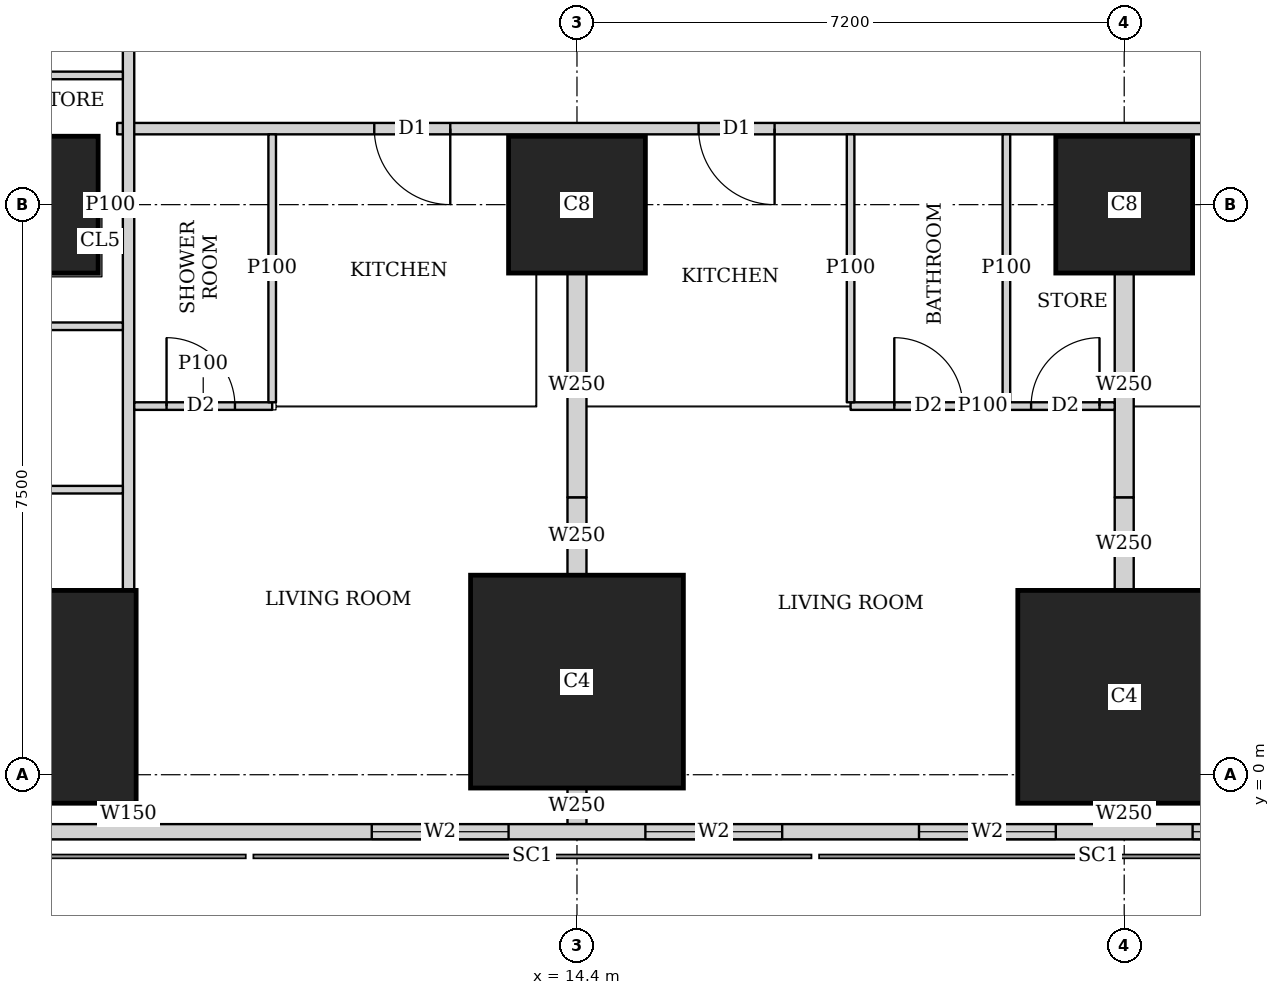
"""IFC4 building model, lengths in metres.
Left out: names, types, materials, properties, quantities, classifications, styles, units other than length and angle.
Written with IfcOpenShell. Run it as: python <this file> out.ifc"""

import sys

from ifc_helpers import new_model, si_unit, direction, frame, frame_2d, origin, origin_2d, place, context, subcontext, project, spatial, rectangle, extrude, element, fill, save


model = new_model("IFC4")
c1 = context("Model", 3, precision=1e-05, world=origin(), true_north=direction((0.0, 1.0)))
c2 = subcontext(c1, "Body", "Model", "MODEL_VIEW")
j1 = project(units=[si_unit("LENGTHUNIT", "METRE"), si_unit("PLANEANGLEUNIT", "RADIAN")], contexts=[c1])
p1 = place(None, origin())
s1 = spatial("IfcSite", under=j1, at=p1, CompositionType="ELEMENT")
p2 = place(p1, origin())
s2 = spatial("IfcBuilding", under=s1, at=p2, CompositionType="ELEMENT")
p3 = place(p2, frame((0.0, 0.0, 42.5)))
s3 = spatial("IfcBuildingStorey", under=s2, at=p3, CompositionType="ELEMENT", Elevation=42.5)
for number, where, z_axis, x_axis in (
    (1, (7.2, 1.025, 0.0), (0.0, 0.0, 1.0), (1.0, 0.0, 0.0)),
    (2, (14.4, 1.225, 0.0), (0.0, 0.0, 1.0), (1.0, 0.0, 0.0)),
    (3, (21.6, 1.025, 0.0), (0.0, 0.0, 1.0), (1.0, 0.0, 0.0)),
):
    element("IfcColumn", number, at=place(p3, frame(where, z_axis=z_axis, x_axis=x_axis)), inside=s3, PredefinedType="COLUMN", context=c2, shape_type="SweptSolid", body=[
        extrude(rectangle(XDim=2.8, YDim=2.8, at=origin_2d()), origin(), (0.0, 0.0, 1.0), 3.75),
    ])
for number, where, z_axis, x_axis in (
    (4, (7.2, 7.5, 0.0), (0.0, 0.0, 1.0), (1.0, 0.0, 0.0)),
    (5, (14.4, 7.5, 0.0), (0.0, 0.0, 1.0), (1.0, 0.0, 0.0)),
    (6, (21.6, 7.5, 0.0), (0.0, 0.0, 1.0), (1.0, 0.0, 0.0)),
):
    element("IfcColumn", number, at=place(p3, frame(where, z_axis=z_axis, x_axis=x_axis)), inside=s3, PredefinedType="COLUMN", context=c2, shape_type="SweptSolid", body=[
        extrude(rectangle(XDim=1.8, YDim=1.8, at=origin_2d()), origin(), (0.0, 0.0, 1.0), 3.75),
    ])
p4 = place(p3, frame((2.163, -0.75, 0.0), z_axis=(0.0, 0.0, 1.0), x_axis=(1.0, 0.0, 0.0)))
e7 = element("IfcWall", 7, at=p4, inside=s3, PredefinedType="SOLIDWALL", context=c2, shape_type="SweptSolid", body=[
    extrude(rectangle(XDim=45.628, YDim=0.2, at=frame_2d((22.814, 0.0))), origin(), (0.0, 0.0, 1.0), 3.5),
])
p5 = place(p4, frame((9.537, 0.0, 0.9)))
e8 = element("IfcOpeningElement", 8, at=p5, cuts=e7, PredefinedType="OPENING", context=c2, shape_type="SweptSolid", body=[
    extrude(rectangle(XDim=1.8, YDim=1.5, at=frame_2d((0.9, 0.75))), frame((0.0, 0.11, 0.0), z_axis=(0.0, -1.0, 0.0), x_axis=(1.0, 0.0, 0.0)), (0.0, 0.0, 1.0), 0.22),
])
p6 = place(p4, frame((13.137, 0.0, 0.9)))
e9 = element("IfcOpeningElement", 9, at=p6, cuts=e7, PredefinedType="OPENING", context=c2, shape_type="SweptSolid", body=[
    extrude(rectangle(XDim=1.8, YDim=1.5, at=frame_2d((0.9, 0.75))), frame((0.0, 0.11, 0.0), z_axis=(0.0, -1.0, 0.0), x_axis=(1.0, 0.0, 0.0)), (0.0, 0.0, 1.0), 0.22),
])
p7 = place(p4, frame((16.737, 0.0, 0.9)))
e10 = element("IfcOpeningElement", 10, at=p7, cuts=e7, PredefinedType="OPENING", context=c2, shape_type="SweptSolid", body=[
    extrude(rectangle(XDim=1.8, YDim=1.5, at=frame_2d((0.9, 0.75))), frame((0.0, 0.11, 0.0), z_axis=(0.0, -1.0, 0.0), x_axis=(1.0, 0.0, 0.0)), (0.0, 0.0, 1.0), 0.22),
])
p8 = place(p4, frame((20.337, 0.0, 0.9)))
e11 = element("IfcOpeningElement", 11, at=p8, cuts=e7, PredefinedType="OPENING", context=c2, shape_type="SweptSolid", body=[
    extrude(rectangle(XDim=1.8, YDim=1.5, at=frame_2d((0.9, 0.75))), frame((0.0, 0.11, 0.0), z_axis=(0.0, -1.0, 0.0), x_axis=(1.0, 0.0, 0.0)), (0.0, 0.0, 1.0), 0.22),
])
p9 = place(p4, frame((23.937, 0.0, 0.9)))
e12 = element("IfcOpeningElement", 12, at=p9, cuts=e7, PredefinedType="OPENING", context=c2, shape_type="SweptSolid", body=[
    extrude(rectangle(XDim=1.8, YDim=1.5, at=frame_2d((0.9, 0.75))), frame((0.0, 0.11, 0.0), z_axis=(0.0, -1.0, 0.0), x_axis=(1.0, 0.0, 0.0)), (0.0, 0.0, 1.0), 0.22),
])
p10 = place(p4, frame((27.537, 0.0, 0.9)))
e13 = element("IfcOpeningElement", 13, at=p10, cuts=e7, PredefinedType="OPENING", context=c2, shape_type="SweptSolid", body=[
    extrude(rectangle(XDim=1.8, YDim=1.5, at=frame_2d((0.9, 0.75))), frame((0.0, 0.11, 0.0), z_axis=(0.0, -1.0, 0.0), x_axis=(1.0, 0.0, 0.0)), (0.0, 0.0, 1.0), 0.22),
])
p11 = place(p4, frame((31.137, 0.0, 0.9)))
e14 = element("IfcOpeningElement", 14, at=p11, cuts=e7, PredefinedType="OPENING", context=c2, shape_type="SweptSolid", body=[
    extrude(rectangle(XDim=1.8, YDim=1.5, at=frame_2d((0.9, 0.75))), frame((0.0, 0.11, 0.0), z_axis=(0.0, -1.0, 0.0), x_axis=(1.0, 0.0, 0.0)), (0.0, 0.0, 1.0), 0.22),
])
p12 = place(p4, frame((34.737, 0.0, 0.9)))
e15 = element("IfcOpeningElement", 15, at=p12, cuts=e7, PredefinedType="OPENING", context=c2, shape_type="SweptSolid", body=[
    extrude(rectangle(XDim=1.8, YDim=1.5, at=frame_2d((0.9, 0.75))), frame((0.0, 0.11, 0.0), z_axis=(0.0, -1.0, 0.0), x_axis=(1.0, 0.0, 0.0)), (0.0, 0.0, 1.0), 0.22),
])
p13 = place(p3, frame((8.5, -0.65, 0.0), z_axis=(0.0, 0.0, 1.0), x_axis=(0.0, 1.0, 0.0)))
e16 = element("IfcWall", 16, at=p13, inside=s3, PredefinedType="SOLIDWALL", context=c2, shape_type="SweptSolid", body=[
    extrude(rectangle(XDim=0.274, YDim=0.15, at=frame_2d((0.137, 0.0))), origin(), (0.0, 0.0, 1.0), 3.5),
])
p14 = place(p3, frame((8.5, 2.426, 0.0), z_axis=(0.0, 0.0, 1.0), x_axis=(0.0, 1.0, 0.0)))
e17 = element("IfcWall", 17, at=p14, inside=s3, PredefinedType="SOLIDWALL", context=c2, shape_type="SweptSolid", body=[
    extrude(rectangle(XDim=40.173, YDim=0.15, at=frame_2d((20.086, 0.0))), origin(), (0.0, 0.0, 1.0), 3.5),
])
p15 = place(p14, frame((9.986, 0.0, 0.0)))
e18 = element("IfcOpeningElement", 18, at=p15, cuts=e17, PredefinedType="OPENING", context=c2, shape_type="SweptSolid", body=[
    extrude(rectangle(XDim=1.0, YDim=2.1, at=frame_2d((0.5, 1.05))), frame((0.0, 0.085, 0.0), z_axis=(0.0, -1.0, 0.0), x_axis=(1.0, 0.0, 0.0)), (0.0, 0.0, 1.0), 0.17),
])
p16 = place(p14, frame((14.161, 0.0, 0.0)))
e19 = element("IfcOpeningElement", 19, at=p16, cuts=e17, PredefinedType="OPENING", context=c2, shape_type="SweptSolid", body=[
    extrude(rectangle(XDim=1.0, YDim=2.1, at=frame_2d((0.5, 1.05))), frame((0.0, 0.085, 0.0), z_axis=(0.0, -1.0, 0.0), x_axis=(1.0, 0.0, 0.0)), (0.0, 0.0, 1.0), 0.17),
])
p17 = place(p14, frame((21.662, 0.0, 0.0)))
e20 = element("IfcOpeningElement", 20, at=p17, cuts=e17, PredefinedType="OPENING", context=c2, shape_type="SweptSolid", body=[
    extrude(rectangle(XDim=1.0, YDim=2.1, at=frame_2d((0.5, 1.05))), frame((0.0, 0.085, 0.0), z_axis=(0.0, -1.0, 0.0), x_axis=(1.0, 0.0, 0.0)), (0.0, 0.0, 1.0), 0.17),
])
p18 = place(p14, frame((29.161, 0.0, 0.0)))
e21 = element("IfcOpeningElement", 21, at=p18, cuts=e17, PredefinedType="OPENING", context=c2, shape_type="SweptSolid", body=[
    extrude(rectangle(XDim=1.0, YDim=2.1, at=frame_2d((0.5, 1.05))), frame((0.0, 0.085, 0.0), z_axis=(0.0, -1.0, 0.0), x_axis=(1.0, 0.0, 0.0)), (0.0, 0.0, 1.0), 0.17),
])
p19 = place(p3, frame((40.054, 8.5, 0.0), z_axis=(0.0, 0.0, 1.0), x_axis=(-1.0, 0.0, 0.0)))
e22 = element("IfcWall", 22, at=p19, inside=s3, PredefinedType="SOLIDWALL", context=c2, shape_type="SweptSolid", body=[
    extrude(rectangle(XDim=31.704, YDim=0.15, at=frame_2d((15.852, 0.0))), origin(), (0.0, 0.0, 1.0), 3.5),
])
p20 = place(p19, frame((27.321, 0.0, 0.0)))
e23 = element("IfcOpeningElement", 23, at=p20, cuts=e22, PredefinedType="OPENING", context=c2, shape_type="SweptSolid", body=[
    extrude(rectangle(XDim=1.0, YDim=2.1, at=frame_2d((0.5, 1.05))), frame((0.0, 0.085, 0.0), z_axis=(0.0, -1.0, 0.0), x_axis=(1.0, 0.0, 0.0)), (0.0, 0.0, 1.0), 0.17),
])
p21 = place(p19, frame((23.054, 0.0, 0.0)))
e24 = element("IfcOpeningElement", 24, at=p21, cuts=e22, PredefinedType="OPENING", context=c2, shape_type="SweptSolid", body=[
    extrude(rectangle(XDim=1.0, YDim=2.1, at=frame_2d((0.5, 1.05))), frame((0.0, 0.085, 0.0), z_axis=(0.0, -1.0, 0.0), x_axis=(1.0, 0.0, 0.0)), (0.0, 0.0, 1.0), 0.17),
])
p22 = place(p19, frame((15.854, 0.0, 0.0)))
e25 = element("IfcOpeningElement", 25, at=p22, cuts=e22, PredefinedType="OPENING", context=c2, shape_type="SweptSolid", body=[
    extrude(rectangle(XDim=1.0, YDim=2.1, at=frame_2d((0.5, 1.05))), frame((0.0, 0.085, 0.0), z_axis=(0.0, -1.0, 0.0), x_axis=(1.0, 0.0, 0.0)), (0.0, 0.0, 1.0), 0.17),
])
p23 = place(p19, frame((8.654, 0.0, 0.0)))
e26 = element("IfcOpeningElement", 26, at=p23, cuts=e22, PredefinedType="OPENING", context=c2, shape_type="SweptSolid", body=[
    extrude(rectangle(XDim=1.0, YDim=2.1, at=frame_2d((0.5, 1.05))), frame((0.0, 0.085, 0.0), z_axis=(0.0, -1.0, 0.0), x_axis=(1.0, 0.0, 0.0)), (0.0, 0.0, 1.0), 0.17),
])
p24 = place(p19, frame((0.15, 0.0, 0.0)))
e27 = element("IfcOpeningElement", 27, at=p24, cuts=e22, PredefinedType="OPENING", context=c2, shape_type="SweptSolid", body=[
    extrude(rectangle(XDim=1.0, YDim=2.1, at=frame_2d((0.5, 1.05))), frame((0.0, 0.085, 0.0), z_axis=(0.0, -1.0, 0.0), x_axis=(1.0, 0.0, 0.0)), (0.0, 0.0, 1.0), 0.17),
])
p25 = place(p3, frame((4.9, 3.75, 0.0), z_axis=(0.0, 0.0, 1.0), x_axis=(1.0, 0.0, 0.0)))
e28 = element("IfcWall", 28, at=p25, inside=s3, PredefinedType="PARTITIONING", context=c2, shape_type="SweptSolid", body=[
    extrude(rectangle(XDim=3.525, YDim=0.1, at=frame_2d((1.763, 0.0))), origin(), (0.0, 0.0, 1.0), 3.5),
])
p26 = place(p3, frame((8.101, 7.5, 0.0), z_axis=(0.0, 0.0, 1.0), x_axis=(1.0, 0.0, 0.0)))
e29 = element("IfcWall", 29, at=p26, inside=s3, PredefinedType="PARTITIONING", context=c2, shape_type="SweptSolid", body=[
    extrude(rectangle(XDim=0.324, YDim=0.1, at=frame_2d((0.162, 0.0))), origin(), (0.0, 0.0, 1.0), 3.5),
])
for number, where, z_axis, x_axis in (
    (30, (4.9, 9.2, 0.0), (0.0, 0.0, 1.0), (1.0, 0.0, 0.0)),
    (31, (4.9, 5.9, 0.0), (0.0, 0.0, 1.0), (1.0, 0.0, 0.0)),
):
    element("IfcWall", number, at=place(p3, frame(where, z_axis=z_axis, x_axis=x_axis)), inside=s3, PredefinedType="PARTITIONING", context=c2, shape_type="SweptSolid", body=[
        extrude(rectangle(XDim=3.525, YDim=0.1, at=frame_2d((1.763, 0.0))), origin(), (0.0, 0.0, 1.0), 3.5),
    ])
p27 = place(p3, frame((10.39, 4.85, 0.0), z_axis=(0.0, 0.0, 1.0), x_axis=(-1.0, 0.0, 0.0)))
e32 = element("IfcWall", 32, at=p27, inside=s3, PredefinedType="PARTITIONING", context=c2, shape_type="SweptSolid", body=[
    extrude(rectangle(XDim=1.815, YDim=0.1, at=frame_2d((0.907, 0.0))), origin(), (0.0, 0.0, 1.0), 3.5),
])
p28 = place(p27, frame((0.49, 0.0, 0.0)))
e33 = element("IfcOpeningElement", 33, at=p28, cuts=e32, PredefinedType="OPENING", context=c2, shape_type="SweptSolid", body=[
    extrude(rectangle(XDim=0.9, YDim=2.1, at=frame_2d((0.45, 1.05))), frame((0.0, 0.06, 0.0), z_axis=(0.0, -1.0, 0.0), x_axis=(1.0, 0.0, 0.0)), (0.0, 0.0, 1.0), 0.12),
])
p29 = place(p3, frame((10.39, 4.9, 0.0), z_axis=(0.0, 0.0, 1.0), x_axis=(0.0, 1.0, 0.0)))
e34 = element("IfcWall", 34, at=p29, inside=s3, PredefinedType="PARTITIONING", context=c2, shape_type="SweptSolid", body=[
    extrude(rectangle(XDim=3.525, YDim=0.1, at=frame_2d((1.763, 0.0))), origin(), (0.0, 0.0, 1.0), 3.5),
])
p30 = place(p3, frame((21.475, 4.85, 0.0), z_axis=(0.0, 0.0, 1.0), x_axis=(-1.0, 0.0, 0.0)))
e35 = element("IfcWall", 35, at=p30, inside=s3, PredefinedType="PARTITIONING", context=c2, shape_type="SweptSolid", body=[
    extrude(rectangle(XDim=3.475, YDim=0.1, at=frame_2d((1.738, 0.0))), origin(), (0.0, 0.0, 1.0), 3.5),
])
p31 = place(p30, frame((2.0, 0.0, 0.0)))
e36 = element("IfcOpeningElement", 36, at=p31, cuts=e35, PredefinedType="OPENING", context=c2, shape_type="SweptSolid", body=[
    extrude(rectangle(XDim=0.9, YDim=2.1, at=frame_2d((0.45, 1.05))), frame((0.0, 0.06, 0.0), z_axis=(0.0, -1.0, 0.0), x_axis=(1.0, 0.0, 0.0)), (0.0, 0.0, 1.0), 0.12),
])
p32 = place(p30, frame((0.2, 0.0, 0.0)))
e37 = element("IfcOpeningElement", 37, at=p32, cuts=e35, PredefinedType="OPENING", context=c2, shape_type="SweptSolid", body=[
    extrude(rectangle(XDim=0.9, YDim=2.1, at=frame_2d((0.45, 1.05))), frame((0.0, 0.06, 0.0), z_axis=(0.0, -1.0, 0.0), x_axis=(1.0, 0.0, 0.0)), (0.0, 0.0, 1.0), 0.12),
])
for number, where, z_axis, x_axis in (
    (38, (18.0, 4.9, 0.0), (0.0, 0.0, 1.0), (0.0, 1.0, 0.0)),
    (39, (20.05, 4.9, 0.0), (0.0, 0.0, 1.0), (0.0, 1.0, 0.0)),
):
    element("IfcWall", number, at=place(p3, frame(where, z_axis=z_axis, x_axis=x_axis)), inside=s3, PredefinedType="PARTITIONING", context=c2, shape_type="SweptSolid", body=[
        extrude(rectangle(XDim=3.525, YDim=0.1, at=frame_2d((1.763, 0.0))), origin(), (0.0, 0.0, 1.0), 3.5),
    ])
p33 = place(p3, frame((14.4, -0.65, 0.0), z_axis=(0.0, 0.0, 1.0), x_axis=(0.0, 1.0, 0.0)))
e40 = element("IfcWall", 40, at=p33, inside=s3, PredefinedType="SOLIDWALL", context=c2, shape_type="SweptSolid", body=[
    extrude(rectangle(XDim=0.474, YDim=0.25, at=frame_2d((0.237, 0.0))), origin(), (0.0, 0.0, 1.0), 3.5),
])
p34 = place(p3, frame((14.4, 2.626, 0.0), z_axis=(0.0, 0.0, 1.0), x_axis=(0.0, 1.0, 0.0)))
e41 = element("IfcWall", 41, at=p34, inside=s3, PredefinedType="SOLIDWALL", context=c2, shape_type="SweptSolid", body=[
    extrude(rectangle(XDim=1.024, YDim=0.25, at=frame_2d((0.512, 0.0))), origin(), (0.0, 0.0, 1.0), 3.5),
])
p35 = place(p3, frame((14.4, 3.65, 0.0), z_axis=(0.0, 0.0, 1.0), x_axis=(0.0, 1.0, 0.0)))
e42 = element("IfcWall", 42, at=p35, inside=s3, PredefinedType="SOLIDWALL", context=c2, shape_type="SweptSolid", body=[
    extrude(rectangle(XDim=2.949, YDim=0.25, at=frame_2d((1.475, 0.0))), origin(), (0.0, 0.0, 1.0), 3.5),
])
p36 = place(p3, frame((21.6, -0.65, 0.0), z_axis=(0.0, 0.0, 1.0), x_axis=(0.0, 1.0, 0.0)))
e43 = element("IfcWall", 43, at=p36, inside=s3, PredefinedType="SOLIDWALL", context=c2, shape_type="SweptSolid", body=[
    extrude(rectangle(XDim=0.274, YDim=0.25, at=frame_2d((0.137, 0.0))), origin(), (0.0, 0.0, 1.0), 3.5),
])
p37 = place(p3, frame((21.6, 2.426, 0.0), z_axis=(0.0, 0.0, 1.0), x_axis=(0.0, 1.0, 0.0)))
e44 = element("IfcWall", 44, at=p37, inside=s3, PredefinedType="SOLIDWALL", context=c2, shape_type="SweptSolid", body=[
    extrude(rectangle(XDim=1.224, YDim=0.25, at=frame_2d((0.612, 0.0))), origin(), (0.0, 0.0, 1.0), 3.5),
])
p38 = place(p3, frame((21.6, 3.65, 0.0), z_axis=(0.0, 0.0, 1.0), x_axis=(0.0, 1.0, 0.0)))
e45 = element("IfcWall", 45, at=p38, inside=s3, PredefinedType="SOLIDWALL", context=c2, shape_type="SweptSolid", body=[
    extrude(rectangle(XDim=2.949, YDim=0.25, at=frame_2d((1.475, 0.0))), origin(), (0.0, 0.0, 1.0), 3.5),
])
p39 = place(p5, origin())
e46 = element("IfcWindow", 46, at=p39, inside=s3, PartitioningType="SINGLE_PANEL", PredefinedType="WINDOW", context=c2, shape_type="SweptSolid", body=[
    extrude(rectangle(XDim=1.8, YDim=1.5, at=frame_2d((0.9, 0.75))), frame((0.0, 0.03, 0.0), z_axis=(0.0, -1.0, 0.0), x_axis=(1.0, 0.0, 0.0)), (0.0, 0.0, 1.0), 0.06),
])
fill(e8, e46)
p40 = place(p6, origin())
e47 = element("IfcWindow", 47, at=p40, inside=s3, PartitioningType="SINGLE_PANEL", PredefinedType="WINDOW", context=c2, shape_type="SweptSolid", body=[
    extrude(rectangle(XDim=1.8, YDim=1.5, at=frame_2d((0.9, 0.75))), frame((0.0, 0.03, 0.0), z_axis=(0.0, -1.0, 0.0), x_axis=(1.0, 0.0, 0.0)), (0.0, 0.0, 1.0), 0.06),
])
fill(e9, e47)
p41 = place(p7, origin())
e48 = element("IfcWindow", 48, at=p41, inside=s3, PartitioningType="SINGLE_PANEL", PredefinedType="WINDOW", context=c2, shape_type="SweptSolid", body=[
    extrude(rectangle(XDim=1.8, YDim=1.5, at=frame_2d((0.9, 0.75))), frame((0.0, 0.03, 0.0), z_axis=(0.0, -1.0, 0.0), x_axis=(1.0, 0.0, 0.0)), (0.0, 0.0, 1.0), 0.06),
])
fill(e10, e48)
p42 = place(p8, origin())
e49 = element("IfcWindow", 49, at=p42, inside=s3, PartitioningType="SINGLE_PANEL", PredefinedType="WINDOW", context=c2, shape_type="SweptSolid", body=[
    extrude(rectangle(XDim=1.8, YDim=1.5, at=frame_2d((0.9, 0.75))), frame((0.0, 0.03, 0.0), z_axis=(0.0, -1.0, 0.0), x_axis=(1.0, 0.0, 0.0)), (0.0, 0.0, 1.0), 0.06),
])
fill(e11, e49)
p43 = place(p28, origin())
e50 = element("IfcDoor", 50, at=p43, inside=s3, OperationType="SINGLE_SWING_LEFT", PredefinedType="DOOR", context=c2, shape_type="SweptSolid", body=[
    extrude(rectangle(XDim=0.9, YDim=2.1, at=frame_2d((0.45, 1.05))), frame((0.0, 0.025, 0.0), z_axis=(0.0, -1.0, 0.0), x_axis=(1.0, 0.0, 0.0)), (0.0, 0.0, 1.0), 0.05),
])
fill(e33, e50)
p44 = place(p20, origin())
e51 = element("IfcDoor", 51, at=p44, inside=s3, OperationType="SINGLE_SWING_LEFT", PredefinedType="DOOR", context=c2, shape_type="SweptSolid", body=[
    extrude(rectangle(XDim=1.0, YDim=2.1, at=frame_2d((0.5, 1.05))), frame((0.0, 0.025, 0.0), z_axis=(0.0, -1.0, 0.0), x_axis=(1.0, 0.0, 0.0)), (0.0, 0.0, 1.0), 0.05),
])
fill(e23, e51)
p45 = place(p31, origin())
e52 = element("IfcDoor", 52, at=p45, inside=s3, OperationType="SINGLE_SWING_LEFT", PredefinedType="DOOR", context=c2, shape_type="SweptSolid", body=[
    extrude(rectangle(XDim=0.9, YDim=2.1, at=frame_2d((0.45, 1.05))), frame((0.0, 0.025, 0.0), z_axis=(0.0, -1.0, 0.0), x_axis=(1.0, 0.0, 0.0)), (0.0, 0.0, 1.0), 0.05),
])
fill(e36, e52)
p46 = place(p32, origin())
e53 = element("IfcDoor", 53, at=p46, inside=s3, OperationType="SINGLE_SWING_RIGHT", PredefinedType="DOOR", context=c2, shape_type="SweptSolid", body=[
    extrude(rectangle(XDim=0.9, YDim=2.1, at=frame_2d((0.45, 1.05))), frame((0.0, 0.025, 0.0), z_axis=(0.0, -1.0, 0.0), x_axis=(1.0, 0.0, 0.0)), (0.0, 0.0, 1.0), 0.05),
])
fill(e37, e53)
p47 = place(p21, origin())
e54 = element("IfcDoor", 54, at=p47, inside=s3, OperationType="SINGLE_SWING_LEFT", PredefinedType="DOOR", context=c2, shape_type="SweptSolid", body=[
    extrude(rectangle(XDim=1.0, YDim=2.1, at=frame_2d((0.5, 1.05))), frame((0.0, 0.025, 0.0), z_axis=(0.0, -1.0, 0.0), x_axis=(1.0, 0.0, 0.0)), (0.0, 0.0, 1.0), 0.05),
])
fill(e24, e54)
save(model, sys.argv[1])
